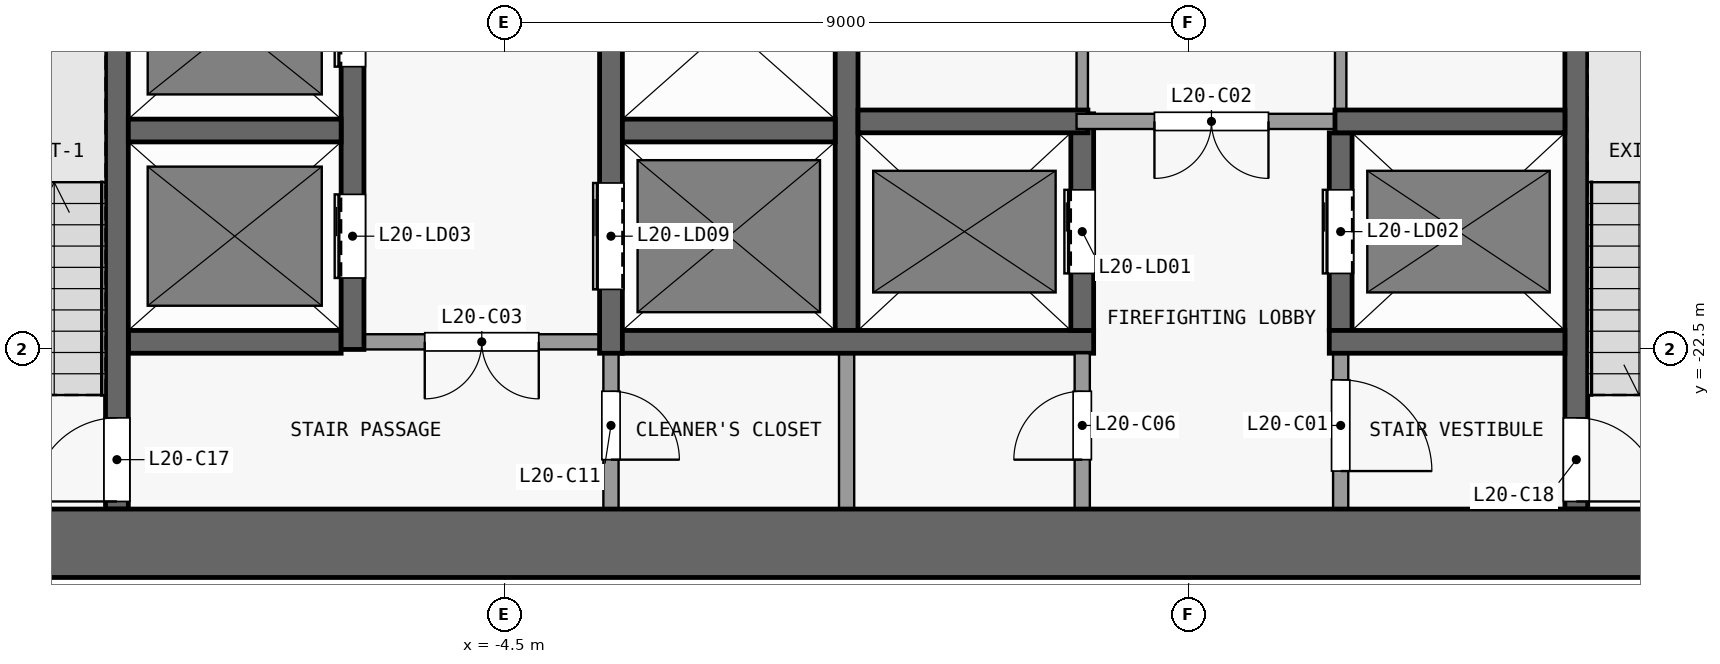
"""IFC4 building model, lengths in metres.
Left out: names, types, materials, properties, quantities, classifications, styles, units other than length and angle.
Written with IfcOpenShell. Run it as: python <this file> out.ifc"""

import sys

from ifc_helpers import new_model, si_unit, direction, frame, frame_2d, origin, place, context, subcontext, project, spatial, rectangle, extrude, element, fill, save


model = new_model("IFC4")
c1 = context("Model", 3, precision=1e-05, world=origin(), true_north=direction((0.0, 1.0)))
c2 = subcontext(c1, "Body", "Model", "MODEL_VIEW")
j1 = project(units=[si_unit("LENGTHUNIT", "METRE"), si_unit("PLANEANGLEUNIT", "RADIAN")], contexts=[c1])
p1 = place(None, origin())
s1 = spatial("IfcSite", under=j1, at=p1, CompositionType="ELEMENT")
p2 = place(p1, origin())
s2 = spatial("IfcBuilding", under=s1, at=p2, CompositionType="ELEMENT")
p3 = place(p2, frame((0.0, 0.0, 84.7)))
s3 = spatial("IfcBuildingStorey", under=s2, at=p3, CompositionType="ELEMENT", Elevation=84.7)
p4 = place(p3, frame((-13.4, -25.05, 0.0), z_axis=(0.0, 0.0, 1.0), x_axis=(1.0, 0.0, 0.0)))
e1 = element("IfcWall", 1, at=p4, inside=s3, PredefinedType="SHEAR", context=c2, shape_type="SweptSolid", body=[
    extrude(rectangle(XDim=26.8, YDim=0.9, at=frame_2d((13.4, 0.0))), origin(), (0.0, 0.0, 1.0), 3.3),
])
p5 = place(p3, frame((-9.45, -22.4, 0.0), z_axis=(0.0, 0.0, 1.0), x_axis=(1.0, 0.0, 0.0)))
e2 = element("IfcWall", 2, at=p5, inside=s3, PredefinedType="SHEAR", context=c2, shape_type="SweptSolid", body=[
    extrude(rectangle(XDim=2.8, YDim=0.3, at=frame_2d((1.4, 0.0))), origin(), (0.0, 0.0, 1.0), 3.3),
])
p6 = place(p3, frame((-3.25, -22.4, 0.0), z_axis=(0.0, 0.0, 1.0), x_axis=(-1.0, 0.0, 0.0)))
e3 = element("IfcWall", 3, at=p6, inside=s3, PredefinedType="PARTITIONING", context=c2, shape_type="SweptSolid", body=[
    extrude(rectangle(XDim=3.1, YDim=0.2, at=frame_2d((1.55, 0.0))), origin(), (0.0, 0.0, 1.0), 3.3),
])
p7 = place(p6, frame((0.8, 0.0, 0.0)))
e4 = element("IfcOpeningElement", 4, at=p7, cuts=e3, PredefinedType="OPENING", context=c2, shape_type="SweptSolid", body=[
    extrude(rectangle(XDim=1.5, YDim=2.1, at=frame_2d((0.75, 1.05))), frame((0.0, 0.11, 0.0), z_axis=(0.0, -1.0, 0.0), x_axis=(1.0, 0.0, 0.0)), (0.0, 0.0, 1.0), 0.22),
])
p8 = place(p3, frame((-2.95, -22.4, 0.0), z_axis=(0.0, 0.0, 1.0), x_axis=(1.0, 0.0, 0.0)))
e5 = element("IfcWall", 5, at=p8, inside=s3, PredefinedType="SHEAR", context=c2, shape_type="SweptSolid", body=[
    extrude(rectangle(XDim=6.2, YDim=0.3, at=frame_2d((3.1, 0.0))), origin(), (0.0, 0.0, 1.0), 3.3),
])
p9 = place(p3, frame((6.35, -22.4, 0.0), z_axis=(0.0, 0.0, 1.0), x_axis=(1.0, 0.0, 0.0)))
e6 = element("IfcWall", 6, at=p9, inside=s3, PredefinedType="SHEAR", context=c2, shape_type="SweptSolid", body=[
    extrude(rectangle(XDim=3.1, YDim=0.3, at=frame_2d((1.55, 0.0))), origin(), (0.0, 0.0, 1.0), 3.3),
])
for number, where, z_axis, x_axis in (
    (7, (-9.45, -19.62, 0.0), (0.0, 0.0, 1.0), (1.0, 0.0, 0.0)),
    (8, (-2.95, -19.62, 0.0), (0.0, 0.0, 1.0), (1.0, 0.0, 0.0)),
):
    element("IfcWall", number, at=place(p3, frame(where, z_axis=z_axis, x_axis=x_axis)), inside=s3, PredefinedType="SHEAR", context=c2, shape_type="SweptSolid", body=[
        extrude(rectangle(XDim=2.8, YDim=0.3, at=frame_2d((1.4, 0.0))), origin(), (0.0, 0.0, 1.0), 3.3),
    ])
p10 = place(p3, frame((0.15, -19.5, 0.0), z_axis=(0.0, 0.0, 1.0), x_axis=(1.0, 0.0, 0.0)))
e9 = element("IfcWall", 9, at=p10, inside=s3, PredefinedType="SHEAR", context=c2, shape_type="SweptSolid", body=[
    extrude(rectangle(XDim=3.025, YDim=0.3, at=frame_2d((1.513, 0.0))), origin(), (0.0, 0.0, 1.0), 3.3),
])
p11 = place(p3, frame((6.575, -19.5, 0.0), z_axis=(0.0, 0.0, 1.0), x_axis=(-1.0, 0.0, 0.0)))
e10 = element("IfcWall", 10, at=p11, inside=s3, PredefinedType="PARTITIONING", context=c2, shape_type="SweptSolid", body=[
    extrude(rectangle(XDim=3.55, YDim=0.2, at=frame_2d((1.775, 0.0))), origin(), (0.0, 0.0, 1.0), 3.3),
])
p12 = place(p11, frame((1.025, 0.0, 0.0)))
e11 = element("IfcOpeningElement", 11, at=p12, cuts=e10, PredefinedType="OPENING", context=c2, shape_type="SweptSolid", body=[
    extrude(rectangle(XDim=1.5, YDim=2.1, at=frame_2d((0.75, 1.05))), frame((0.0, 0.11, 0.0), z_axis=(0.0, -1.0, 0.0), x_axis=(1.0, 0.0, 0.0)), (0.0, 0.0, 1.0), 0.22),
])
p13 = place(p3, frame((6.425, -19.5, 0.0), z_axis=(0.0, 0.0, 1.0), x_axis=(1.0, 0.0, 0.0)))
e12 = element("IfcWall", 12, at=p13, inside=s3, PredefinedType="SHEAR", context=c2, shape_type="SweptSolid", body=[
    extrude(rectangle(XDim=3.025, YDim=0.3, at=frame_2d((1.512, 0.0))), origin(), (0.0, 0.0, 1.0), 3.3),
])
p14 = place(p3, frame((-9.6, -24.6, 0.0), z_axis=(0.0, 0.0, 1.0), x_axis=(0.0, 1.0, 0.0)))
e13 = element("IfcWall", 13, at=p14, inside=s3, PredefinedType="SHEAR", context=c2, shape_type="SweptSolid", body=[
    extrude(rectangle(XDim=7.7, YDim=0.3, at=frame_2d((3.85, 0.0))), origin(), (0.0, 0.0, 1.0), 3.3),
])
p15 = place(p14, frame((0.1, 0.0, 0.0)))
e14 = element("IfcOpeningElement", 14, at=p15, cuts=e13, PredefinedType="OPENING", context=c2, shape_type="SweptSolid", body=[
    extrude(rectangle(XDim=1.1, YDim=2.1, at=frame_2d((0.55, 1.05))), frame((0.0, 0.16, 0.0), z_axis=(0.0, -1.0, 0.0), x_axis=(1.0, 0.0, 0.0)), (0.0, 0.0, 1.0), 0.32),
])
p16 = place(p3, frame((-6.5, -22.5, 0.0), z_axis=(0.0, 0.0, 1.0), x_axis=(0.0, 1.0, 0.0)))
e15 = element("IfcWall", 15, at=p16, inside=s3, PredefinedType="SHEAR", context=c2, shape_type="SweptSolid", body=[
    extrude(rectangle(XDim=14.0, YDim=0.3, at=frame_2d((7.0, 0.0))), origin(), (0.0, 0.0, 1.0), 3.3),
])
p17 = place(p16, frame((0.94, 0.0, 0.0)))
e16 = element("IfcOpeningElement", 16, at=p17, cuts=e15, PredefinedType="OPENING", context=c2, shape_type="SweptSolid", body=[
    extrude(rectangle(XDim=1.1, YDim=2.1, at=frame_2d((0.55, 1.05))), frame((0.0, 0.16, 0.0), z_axis=(0.0, -1.0, 0.0), x_axis=(1.0, 0.0, 0.0)), (0.0, 0.0, 1.0), 0.32),
])
p18 = place(p16, frame((3.72, 0.0, 0.0)))
e17 = element("IfcOpeningElement", 17, at=p18, cuts=e15, PredefinedType="OPENING", context=c2, shape_type="SweptSolid", body=[
    extrude(rectangle(XDim=1.1, YDim=2.1, at=frame_2d((0.55, 1.05))), frame((0.0, 0.16, 0.0), z_axis=(0.0, -1.0, 0.0), x_axis=(1.0, 0.0, 0.0)), (0.0, 0.0, 1.0), 0.32),
])
p19 = place(p16, frame((6.5, 0.0, 0.0)))
e18 = element("IfcOpeningElement", 18, at=p19, cuts=e15, PredefinedType="OPENING", context=c2, shape_type="SweptSolid", body=[
    extrude(rectangle(XDim=1.1, YDim=2.1, at=frame_2d((0.55, 1.05))), frame((0.0, 0.16, 0.0), z_axis=(0.0, -1.0, 0.0), x_axis=(1.0, 0.0, 0.0)), (0.0, 0.0, 1.0), 0.32),
])
p20 = place(p16, frame((9.28, 0.0, 0.0)))
e19 = element("IfcOpeningElement", 19, at=p20, cuts=e15, PredefinedType="OPENING", context=c2, shape_type="SweptSolid", body=[
    extrude(rectangle(XDim=1.1, YDim=2.1, at=frame_2d((0.55, 1.05))), frame((0.0, 0.16, 0.0), z_axis=(0.0, -1.0, 0.0), x_axis=(1.0, 0.0, 0.0)), (0.0, 0.0, 1.0), 0.32),
])
p21 = place(p16, frame((12.06, 0.0, 0.0)))
e20 = element("IfcOpeningElement", 20, at=p21, cuts=e15, PredefinedType="OPENING", context=c2, shape_type="SweptSolid", body=[
    extrude(rectangle(XDim=1.1, YDim=2.1, at=frame_2d((0.55, 1.05))), frame((0.0, 0.16, 0.0), z_axis=(0.0, -1.0, 0.0), x_axis=(1.0, 0.0, 0.0)), (0.0, 0.0, 1.0), 0.32),
])
p22 = place(p3, frame((-3.1, -22.55, 0.0), z_axis=(0.0, 0.0, 1.0), x_axis=(0.0, -1.0, 0.0)))
e21 = element("IfcWall", 21, at=p22, inside=s3, PredefinedType="PARTITIONING", context=c2, shape_type="SweptSolid", body=[
    extrude(rectangle(XDim=2.05, YDim=0.2, at=frame_2d((1.025, 0.0))), origin(), (0.0, 0.0, 1.0), 3.3),
])
p23 = place(p22, frame((0.5, 0.0, 0.0)))
e22 = element("IfcOpeningElement", 22, at=p23, cuts=e21, PredefinedType="OPENING", context=c2, shape_type="SweptSolid", body=[
    extrude(rectangle(XDim=0.9, YDim=2.1, at=frame_2d((0.45, 1.05))), frame((0.0, 0.11, 0.0), z_axis=(0.0, -1.0, 0.0), x_axis=(1.0, 0.0, 0.0)), (0.0, 0.0, 1.0), 0.22),
])
p24 = place(p3, frame((-3.1, -22.55, 0.0), z_axis=(0.0, 0.0, 1.0), x_axis=(0.0, 1.0, 0.0)))
e23 = element("IfcWall", 23, at=p24, inside=s3, PredefinedType="SHEAR", context=c2, shape_type="SweptSolid", body=[
    extrude(rectangle(XDim=14.05, YDim=0.3, at=frame_2d((7.025, 0.0))), origin(), (0.0, 0.0, 1.0), 3.3),
])
p25 = place(p24, frame((12.11, 0.0, 0.0)))
e24 = element("IfcOpeningElement", 24, at=p25, cuts=e23, PredefinedType="OPENING", context=c2, shape_type="SweptSolid", body=[
    extrude(rectangle(XDim=1.1, YDim=2.1, at=frame_2d((0.55, 1.05))), frame((0.0, 0.16, 0.0), z_axis=(0.0, -1.0, 0.0), x_axis=(1.0, 0.0, 0.0)), (0.0, 0.0, 1.0), 0.32),
])
p26 = place(p24, frame((0.84, 0.0, 0.0)))
e25 = element("IfcOpeningElement", 25, at=p26, cuts=e23, PredefinedType="OPENING", context=c2, shape_type="SweptSolid", body=[
    extrude(rectangle(XDim=1.4, YDim=2.1, at=frame_2d((0.7, 1.05))), frame((0.0, 0.16, 0.0), z_axis=(0.0, -1.0, 0.0), x_axis=(1.0, 0.0, 0.0)), (0.0, 0.0, 1.0), 0.32),
])
p27 = place(p3, frame((0.0, -24.6, 0.0), z_axis=(0.0, 0.0, 1.0), x_axis=(0.0, 1.0, 0.0)))
e26 = element("IfcWall", 26, at=p27, inside=s3, PredefinedType="PARTITIONING", context=c2, shape_type="SweptSolid", body=[
    extrude(rectangle(XDim=2.05, YDim=0.2, at=frame_2d((1.025, 0.0))), origin(), (0.0, 0.0, 1.0), 3.3),
])
p28 = place(p3, frame((0.0, -22.25, 0.0), z_axis=(0.0, 0.0, 1.0), x_axis=(0.0, 1.0, 0.0)))
e27 = element("IfcWall", 27, at=p28, inside=s3, PredefinedType="SHEAR", context=c2, shape_type="SweptSolid", body=[
    extrude(rectangle(XDim=13.75, YDim=0.3, at=frame_2d((6.875, 0.0))), origin(), (0.0, 0.0, 1.0), 3.3),
])
p29 = place(p3, frame((3.1, -24.6, 0.0), z_axis=(0.0, 0.0, 1.0), x_axis=(0.0, 1.0, 0.0)))
e28 = element("IfcWall", 28, at=p29, inside=s3, PredefinedType="PARTITIONING", context=c2, shape_type="SweptSolid", body=[
    extrude(rectangle(XDim=2.05, YDim=0.2, at=frame_2d((1.025, 0.0))), origin(), (0.0, 0.0, 1.0), 3.3),
])
p30 = place(p29, frame((0.65, 0.0, 0.0)))
e29 = element("IfcOpeningElement", 29, at=p30, cuts=e28, PredefinedType="OPENING", context=c2, shape_type="SweptSolid", body=[
    extrude(rectangle(XDim=0.9, YDim=2.1, at=frame_2d((0.45, 1.05))), frame((0.0, 0.11, 0.0), z_axis=(0.0, -1.0, 0.0), x_axis=(1.0, 0.0, 0.0)), (0.0, 0.0, 1.0), 0.22),
])
p31 = place(p3, frame((3.1, -22.25, 0.0), z_axis=(0.0, 0.0, 1.0), x_axis=(0.0, 1.0, 0.0)))
e30 = element("IfcWall", 30, at=p31, inside=s3, PredefinedType="SHEAR", context=c2, shape_type="SweptSolid", body=[
    extrude(rectangle(XDim=2.85, YDim=0.3, at=frame_2d((1.425, 0.0))), origin(), (0.0, 0.0, 1.0), 3.3),
])
p32 = place(p31, frame((0.75, 0.0, 0.0)))
e31 = element("IfcOpeningElement", 31, at=p32, cuts=e30, PredefinedType="OPENING", context=c2, shape_type="SweptSolid", body=[
    extrude(rectangle(XDim=1.1, YDim=2.1, at=frame_2d((0.55, 1.05))), frame((0.0, 0.16, 0.0), z_axis=(0.0, -1.0, 0.0), x_axis=(1.0, 0.0, 0.0)), (0.0, 0.0, 1.0), 0.32),
])
p33 = place(p3, frame((3.1, -19.4, 0.0), z_axis=(0.0, 0.0, 1.0), x_axis=(0.0, 1.0, 0.0)))
e32 = element("IfcWall", 32, at=p33, inside=s3, PredefinedType="PARTITIONING", context=c2, shape_type="SweptSolid", body=[
    extrude(rectangle(XDim=10.9, YDim=0.15, at=frame_2d((5.45, 0.0))), origin(), (0.0, 0.0, 1.0), 3.3),
])
p34 = place(p33, frame((4.8, 0.0, 0.0)))
e33 = element("IfcOpeningElement", 33, at=p34, cuts=e32, PredefinedType="OPENING", context=c2, shape_type="SweptSolid", body=[
    extrude(rectangle(XDim=1.2, YDim=2.1, at=frame_2d((0.6, 1.05))), frame((0.0, 0.085, 0.0), z_axis=(0.0, -1.0, 0.0), x_axis=(1.0, 0.0, 0.0)), (0.0, 0.0, 1.0), 0.17),
])
p35 = place(p3, frame((6.5, -22.55, 0.0), z_axis=(0.0, 0.0, 1.0), x_axis=(0.0, -1.0, 0.0)))
e34 = element("IfcWall", 34, at=p35, inside=s3, PredefinedType="PARTITIONING", context=c2, shape_type="SweptSolid", body=[
    extrude(rectangle(XDim=2.05, YDim=0.2, at=frame_2d((1.025, 0.0))), origin(), (0.0, 0.0, 1.0), 3.3),
])
p36 = place(p35, frame((0.35, 0.0, 0.0)))
e35 = element("IfcOpeningElement", 35, at=p36, cuts=e34, PredefinedType="OPENING", context=c2, shape_type="SweptSolid", body=[
    extrude(rectangle(XDim=1.2, YDim=2.1, at=frame_2d((0.6, 1.05))), frame((0.0, 0.11, 0.0), z_axis=(0.0, -1.0, 0.0), x_axis=(1.0, 0.0, 0.0)), (0.0, 0.0, 1.0), 0.22),
])
p37 = place(p3, frame((6.5, -22.25, 0.0), z_axis=(0.0, 0.0, 1.0), x_axis=(0.0, 1.0, 0.0)))
e36 = element("IfcWall", 36, at=p37, inside=s3, PredefinedType="SHEAR", context=c2, shape_type="SweptSolid", body=[
    extrude(rectangle(XDim=2.6, YDim=0.3, at=frame_2d((1.3, 0.0))), origin(), (0.0, 0.0, 1.0), 3.3),
])
p38 = place(p37, frame((0.75, 0.0, 0.0)))
e37 = element("IfcOpeningElement", 37, at=p38, cuts=e36, PredefinedType="OPENING", context=c2, shape_type="SweptSolid", body=[
    extrude(rectangle(XDim=1.1, YDim=2.1, at=frame_2d((0.55, 1.05))), frame((0.0, 0.16, 0.0), z_axis=(0.0, -1.0, 0.0), x_axis=(1.0, 0.0, 0.0)), (0.0, 0.0, 1.0), 0.32),
])
p39 = place(p3, frame((6.5, -8.5, 0.0), z_axis=(0.0, 0.0, 1.0), x_axis=(0.0, -1.0, 0.0)))
e38 = element("IfcWall", 38, at=p39, inside=s3, PredefinedType="PARTITIONING", context=c2, shape_type="SweptSolid", body=[
    extrude(rectangle(XDim=10.85, YDim=0.15, at=frame_2d((5.425, 0.0))), origin(), (0.0, 0.0, 1.0), 3.3),
])
p40 = place(p39, frame((6.275, 0.0, 0.0)))
e39 = element("IfcOpeningElement", 39, at=p40, cuts=e38, PredefinedType="OPENING", context=c2, shape_type="SweptSolid", body=[
    extrude(rectangle(XDim=1.2, YDim=2.1, at=frame_2d((0.6, 1.05))), frame((0.0, 0.085, 0.0), z_axis=(0.0, -1.0, 0.0), x_axis=(1.0, 0.0, 0.0)), (0.0, 0.0, 1.0), 0.17),
])
p41 = place(p39, frame((0.925, 0.0, 0.0)))
e40 = element("IfcOpeningElement", 40, at=p41, cuts=e38, PredefinedType="OPENING", context=c2, shape_type="SweptSolid", body=[
    extrude(rectangle(XDim=0.9, YDim=2.1, at=frame_2d((0.45, 1.05))), frame((0.0, 0.085, 0.0), z_axis=(0.0, -1.0, 0.0), x_axis=(1.0, 0.0, 0.0)), (0.0, 0.0, 1.0), 0.17),
])
p42 = place(p3, frame((9.6, -16.9, 0.0), z_axis=(0.0, 0.0, 1.0), x_axis=(0.0, -1.0, 0.0)))
e41 = element("IfcWall", 41, at=p42, inside=s3, PredefinedType="SHEAR", context=c2, shape_type="SweptSolid", body=[
    extrude(rectangle(XDim=7.7, YDim=0.3, at=frame_2d((3.85, 0.0))), origin(), (0.0, 0.0, 1.0), 3.3),
])
p43 = place(p42, frame((6.5, 0.0, 0.0)))
e42 = element("IfcOpeningElement", 42, at=p43, cuts=e41, PredefinedType="OPENING", context=c2, shape_type="SweptSolid", body=[
    extrude(rectangle(XDim=1.1, YDim=2.1, at=frame_2d((0.55, 1.05))), frame((0.0, 0.16, 0.0), z_axis=(0.0, -1.0, 0.0), x_axis=(1.0, 0.0, 0.0)), (0.0, 0.0, 1.0), 0.32),
])
p44 = place(p32, origin())
e43 = element("IfcDoor", 43, at=p44, inside=s3, OperationType="DOUBLE_DOOR_SLIDING", PredefinedType="DOOR", context=c2, shape_type="SweptSolid", body=[
    extrude(rectangle(XDim=1.1, YDim=2.1, at=frame_2d((0.55, 1.05))), frame((0.0, 0.025, 0.0), z_axis=(0.0, -1.0, 0.0), x_axis=(1.0, 0.0, 0.0)), (0.0, 0.0, 1.0), 0.05),
])
fill(e31, e43)
p45 = place(p38, origin())
e44 = element("IfcDoor", 44, at=p45, inside=s3, OperationType="DOUBLE_DOOR_SLIDING", PredefinedType="DOOR", context=c2, shape_type="SweptSolid", body=[
    extrude(rectangle(XDim=1.1, YDim=2.1, at=frame_2d((0.55, 1.05))), frame((0.0, 0.025, 0.0), z_axis=(0.0, -1.0, 0.0), x_axis=(1.0, 0.0, 0.0)), (0.0, 0.0, 1.0), 0.05),
])
fill(e37, e44)
p46 = place(p17, origin())
e45 = element("IfcDoor", 45, at=p46, inside=s3, OperationType="DOUBLE_DOOR_SLIDING", PredefinedType="DOOR", context=c2, shape_type="SweptSolid", body=[
    extrude(rectangle(XDim=1.1, YDim=2.1, at=frame_2d((0.55, 1.05))), frame((0.0, 0.025, 0.0), z_axis=(0.0, -1.0, 0.0), x_axis=(1.0, 0.0, 0.0)), (0.0, 0.0, 1.0), 0.05),
])
fill(e16, e45)
p47 = place(p18, origin())
e46 = element("IfcDoor", 46, at=p47, inside=s3, OperationType="DOUBLE_DOOR_SLIDING", PredefinedType="DOOR", context=c2, shape_type="SweptSolid", body=[
    extrude(rectangle(XDim=1.1, YDim=2.1, at=frame_2d((0.55, 1.05))), frame((0.0, 0.025, 0.0), z_axis=(0.0, -1.0, 0.0), x_axis=(1.0, 0.0, 0.0)), (0.0, 0.0, 1.0), 0.05),
])
fill(e17, e46)
p48 = place(p26, origin())
e47 = element("IfcDoor", 47, at=p48, inside=s3, OperationType="DOUBLE_DOOR_SLIDING", PredefinedType="DOOR", context=c2, shape_type="SweptSolid", body=[
    extrude(rectangle(XDim=1.4, YDim=2.1, at=frame_2d((0.7, 1.05))), frame((0.0, 0.025, 0.0), z_axis=(0.0, -1.0, 0.0), x_axis=(1.0, 0.0, 0.0)), (0.0, 0.0, 1.0), 0.05),
])
fill(e25, e47)
p49 = place(p36, origin())
e48 = element("IfcDoor", 48, at=p49, inside=s3, OperationType="SINGLE_SWING_RIGHT", PredefinedType="DOOR", context=c2, shape_type="SweptSolid", body=[
    extrude(rectangle(XDim=1.2, YDim=2.1, at=frame_2d((0.6, 1.05))), frame((0.0, 0.025, 0.0), z_axis=(0.0, -1.0, 0.0), x_axis=(1.0, 0.0, 0.0)), (0.0, 0.0, 1.0), 0.05),
])
fill(e35, e48)
p50 = place(p12, origin())
e49 = element("IfcDoor", 49, at=p50, inside=s3, OperationType="DOUBLE_DOOR_SINGLE_SWING", PredefinedType="DOOR", context=c2, shape_type="SweptSolid", body=[
    extrude(rectangle(XDim=1.5, YDim=2.1, at=frame_2d((0.75, 1.05))), frame((0.0, 0.025, 0.0), z_axis=(0.0, -1.0, 0.0), x_axis=(1.0, 0.0, 0.0)), (0.0, 0.0, 1.0), 0.05),
])
fill(e11, e49)
p51 = place(p7, origin())
e50 = element("IfcDoor", 50, at=p51, inside=s3, OperationType="DOUBLE_DOOR_SINGLE_SWING", PredefinedType="DOOR", context=c2, shape_type="SweptSolid", body=[
    extrude(rectangle(XDim=1.5, YDim=2.1, at=frame_2d((0.75, 1.05))), frame((0.0, 0.025, 0.0), z_axis=(0.0, -1.0, 0.0), x_axis=(1.0, 0.0, 0.0)), (0.0, 0.0, 1.0), 0.05),
])
fill(e4, e50)
p52 = place(p30, origin())
e51 = element("IfcDoor", 51, at=p52, inside=s3, OperationType="SINGLE_SWING_LEFT", PredefinedType="DOOR", context=c2, shape_type="SweptSolid", body=[
    extrude(rectangle(XDim=0.9, YDim=2.1, at=frame_2d((0.45, 1.05))), frame((0.0, 0.025, 0.0), z_axis=(0.0, -1.0, 0.0), x_axis=(1.0, 0.0, 0.0)), (0.0, 0.0, 1.0), 0.05),
])
fill(e29, e51)
p53 = place(p23, origin())
e52 = element("IfcDoor", 52, at=p53, inside=s3, OperationType="SINGLE_SWING_RIGHT", PredefinedType="DOOR", context=c2, shape_type="SweptSolid", body=[
    extrude(rectangle(XDim=0.9, YDim=2.1, at=frame_2d((0.45, 1.05))), frame((0.0, 0.025, 0.0), z_axis=(0.0, -1.0, 0.0), x_axis=(1.0, 0.0, 0.0)), (0.0, 0.0, 1.0), 0.05),
])
fill(e22, e52)
p54 = place(p15, origin())
e53 = element("IfcDoor", 53, at=p54, inside=s3, OperationType="SINGLE_SWING_LEFT", PredefinedType="DOOR", context=c2, shape_type="SweptSolid", body=[
    extrude(rectangle(XDim=1.1, YDim=2.1, at=frame_2d((0.55, 1.05))), frame((0.0, 0.025, 0.0), z_axis=(0.0, -1.0, 0.0), x_axis=(1.0, 0.0, 0.0)), (0.0, 0.0, 1.0), 0.05),
])
fill(e14, e53)
p55 = place(p43, origin())
e54 = element("IfcDoor", 54, at=p55, inside=s3, OperationType="SINGLE_SWING_RIGHT", PredefinedType="DOOR", context=c2, shape_type="SweptSolid", body=[
    extrude(rectangle(XDim=1.1, YDim=2.1, at=frame_2d((0.55, 1.05))), frame((0.0, 0.025, 0.0), z_axis=(0.0, -1.0, 0.0), x_axis=(1.0, 0.0, 0.0)), (0.0, 0.0, 1.0), 0.05),
])
fill(e42, e54)
save(model, sys.argv[1])
